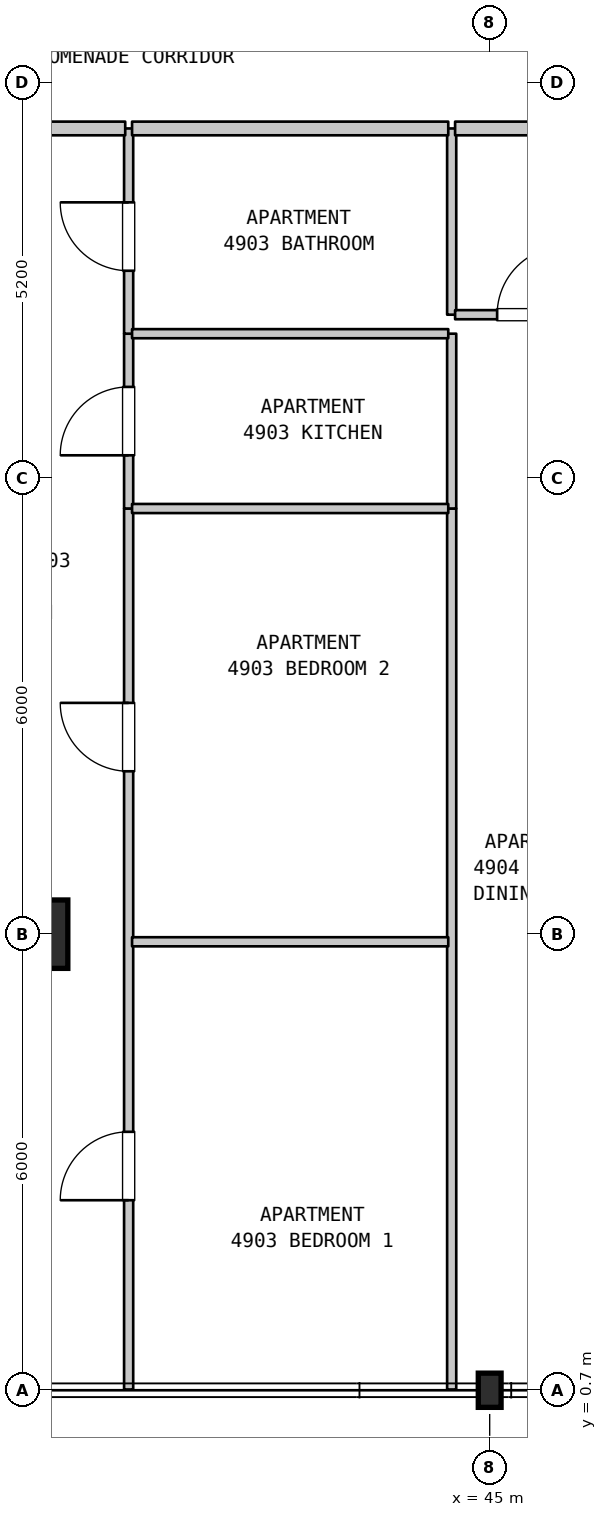
"""IFC4 building model, lengths in metres.
Left out: names, types, materials, properties, quantities, classifications, styles, units other than length and angle.
Written with IfcOpenShell. Run it as: python <this file> out.ifc"""

import sys

from ifc_helpers import new_model, si_unit, direction, frame, frame_2d, origin, origin_2d, place, context, subcontext, project, spatial, rectangle, i_section, extrude, element, fill, save


model = new_model("IFC4")
c1 = context("Model", 3, precision=1e-05, world=origin(), true_north=direction((0.0, 1.0)))
c2 = subcontext(c1, "Body", "Model", "MODEL_VIEW")
j1 = project(units=[si_unit("LENGTHUNIT", "METRE"), si_unit("PLANEANGLEUNIT", "RADIAN")], contexts=[c1])
p1 = place(None, origin())
s1 = spatial("IfcSite", under=j1, at=p1, CompositionType="ELEMENT")
p2 = place(p1, origin())
s2 = spatial("IfcBuilding", under=s1, at=p2, CompositionType="ELEMENT")
p3 = place(p2, frame((0.0, 0.0, 199.5)))
s3 = spatial("IfcBuildingStorey", under=s2, at=p3, CompositionType="ELEMENT", Elevation=199.5)
p4 = place(p3, frame((39.0, 6.7, 0.0), z_axis=(0.0, 0.0, 1.0), x_axis=(1.0, 0.0, 0.0)))
e1 = element("IfcColumn", 1, at=p4, inside=s3, PredefinedType="COLUMN", context=c2, shape_type="SweptSolid", body=[
    extrude(rectangle(XDim=0.9, YDim=0.9, at=origin_2d()), origin(), (0.0, 0.0, 1.0), 3.7),
])
p5 = place(p3, frame((45.0, 0.7, 0.0), z_axis=(0.0, 0.0, 1.0), x_axis=(1.0, 0.0, 0.0)))
e2 = element("IfcColumn", 2, at=p5, inside=s3, PredefinedType="COLUMN", context=c2, shape_type="SweptSolid", body=[
    extrude(i_section(OverallWidth=0.3, OverallDepth=0.45, WebThickness=0.014, FlangeThickness=0.026, FilletRadius=0.027, at=origin_2d()), origin(), (0.0, 0.0, 1.0), 3.7),
])
p6 = place(p3, frame((40.25, 0.71, 0.0), z_axis=(0.0, 0.0, 1.0), x_axis=(0.0, 1.0, 0.0)))
e3 = element("IfcWall", 3, at=p6, inside=s3, PredefinedType="PARTITIONING", context=c2, shape_type="SweptSolid", body=[
    extrude(rectangle(XDim=11.59, YDim=0.12, at=frame_2d((5.795, 0.0))), origin(), (0.0, 0.0, 1.0), 3.39),
])
p7 = place(p6, frame((2.49, 0.0, 0.0)))
e4 = element("IfcOpeningElement", 4, at=p7, cuts=e3, PredefinedType="OPENING", context=c2, shape_type="SweptSolid", body=[
    extrude(rectangle(XDim=0.9, YDim=2.15, at=frame_2d((0.45, 1.075))), frame((0.0, 0.07, 0.0), z_axis=(0.0, -1.0, 0.0), x_axis=(1.0, 0.0, 0.0)), (0.0, 0.0, 1.0), 0.14),
])
p8 = place(p6, frame((8.133, 0.0, 0.0)))
e5 = element("IfcOpeningElement", 5, at=p8, cuts=e3, PredefinedType="OPENING", context=c2, shape_type="SweptSolid", body=[
    extrude(rectangle(XDim=0.9, YDim=2.15, at=frame_2d((0.45, 1.075))), frame((0.0, 0.07, 0.0), z_axis=(0.0, -1.0, 0.0), x_axis=(1.0, 0.0, 0.0)), (0.0, 0.0, 1.0), 0.14),
])
p9 = place(p3, frame((40.25, 12.3, 0.0), z_axis=(0.0, 0.0, 1.0), x_axis=(0.0, 1.0, 0.0)))
e6 = element("IfcWall", 6, at=p9, inside=s3, PredefinedType="PARTITIONING", context=c2, shape_type="SweptSolid", body=[
    extrude(rectangle(XDim=2.3, YDim=0.12, at=frame_2d((1.15, 0.0))), origin(), (0.0, 0.0, 1.0), 3.39),
])
p10 = place(p9, frame((0.7, 0.0, 0.0)))
e7 = element("IfcOpeningElement", 7, at=p10, cuts=e6, PredefinedType="OPENING", context=c2, shape_type="SweptSolid", body=[
    extrude(rectangle(XDim=0.9, YDim=2.15, at=frame_2d((0.45, 1.075))), frame((0.0, 0.07, 0.0), z_axis=(0.0, -1.0, 0.0), x_axis=(1.0, 0.0, 0.0)), (0.0, 0.0, 1.0), 0.14),
])
p11 = place(p3, frame((40.25, 14.6, 0.0), z_axis=(0.0, 0.0, 1.0), x_axis=(0.0, 1.0, 0.0)))
e8 = element("IfcWall", 8, at=p11, inside=s3, PredefinedType="PARTITIONING", context=c2, shape_type="SweptSolid", body=[
    extrude(rectangle(XDim=2.7, YDim=0.12, at=frame_2d((1.35, 0.0))), origin(), (0.0, 0.0, 1.0), 3.39),
])
p12 = place(p11, frame((0.828, 0.0, 0.0)))
e9 = element("IfcOpeningElement", 9, at=p12, cuts=e8, PredefinedType="OPENING", context=c2, shape_type="SweptSolid", body=[
    extrude(rectangle(XDim=0.9, YDim=2.1, at=frame_2d((0.45, 1.05))), frame((0.0, 0.07, 0.0), z_axis=(0.0, -1.0, 0.0), x_axis=(1.0, 0.0, 0.0)), (0.0, 0.0, 1.0), 0.14),
])
p13 = place(p3, frame((44.5, 0.71, 0.0), z_axis=(0.0, 0.0, 1.0), x_axis=(0.0, 1.0, 0.0)))
e10 = element("IfcWall", 10, at=p13, inside=s3, PredefinedType="PARTITIONING", context=c2, shape_type="SweptSolid", body=[
    extrude(rectangle(XDim=11.59, YDim=0.12, at=frame_2d((5.795, 0.0))), origin(), (0.0, 0.0, 1.0), 3.39),
])
p14 = place(p3, frame((44.5, 12.3, 0.0), z_axis=(0.0, 0.0, 1.0), x_axis=(0.0, 1.0, 0.0)))
e11 = element("IfcWall", 11, at=p14, inside=s3, PredefinedType="PARTITIONING", context=c2, shape_type="SweptSolid", body=[
    extrude(rectangle(XDim=2.3, YDim=0.12, at=frame_2d((1.15, 0.0))), origin(), (0.0, 0.0, 1.0), 3.39),
])
p15 = place(p3, frame((44.5, 14.85, 0.0), z_axis=(0.0, 0.0, 1.0), x_axis=(0.0, 1.0, 0.0)))
e12 = element("IfcWall", 12, at=p15, inside=s3, PredefinedType="PARTITIONING", context=c2, shape_type="SweptSolid", body=[
    extrude(rectangle(XDim=2.45, YDim=0.12, at=frame_2d((1.225, 0.0))), origin(), (0.0, 0.0, 1.0), 3.39),
])
p16 = place(p3, frame((40.295, 6.6, 0.0), z_axis=(0.0, 0.0, 1.0), x_axis=(1.0, 0.0, 0.0)))
e13 = element("IfcWall", 13, at=p16, inside=s3, PredefinedType="PARTITIONING", context=c2, shape_type="SweptSolid", body=[
    extrude(rectangle(XDim=4.16, YDim=0.12, at=frame_2d((2.08, 0.0))), origin(), (0.0, 0.0, 1.0), 2.79),
])
for number, where, z_axis, x_axis in (
    (14, (40.295, 12.3, 0.0), (0.0, 0.0, 1.0), (1.0, 0.0, 0.0)),
    (15, (40.295, 14.6, 0.0), (0.0, 0.0, 1.0), (1.0, 0.0, 0.0)),
):
    element("IfcWall", number, at=place(p3, frame(where, z_axis=z_axis, x_axis=x_axis)), inside=s3, PredefinedType="PARTITIONING", context=c2, shape_type="SweptSolid", body=[
        extrude(rectangle(XDim=4.16, YDim=0.12, at=frame_2d((2.08, 0.0))), origin(), (0.0, 0.0, 1.0), 3.39),
    ])
p17 = place(p3, frame((44.545, 14.85, 0.0), z_axis=(0.0, 0.0, 1.0), x_axis=(1.0, 0.0, 0.0)))
e16 = element("IfcWall", 16, at=p17, inside=s3, PredefinedType="PARTITIONING", context=c2, shape_type="SweptSolid", body=[
    extrude(rectangle(XDim=2.16, YDim=0.12, at=frame_2d((1.08, 0.0))), origin(), (0.0, 0.0, 1.0), 3.39),
])
p18 = place(p17, frame((0.553, 0.0, 0.0)))
e17 = element("IfcOpeningElement", 17, at=p18, cuts=e16, PredefinedType="OPENING", context=c2, shape_type="SweptSolid", body=[
    extrude(rectangle(XDim=0.9, YDim=2.15, at=frame_2d((0.45, 1.075))), frame((0.0, 0.07, 0.0), z_axis=(0.0, -1.0, 0.0), x_axis=(1.0, 0.0, 0.0)), (0.0, 0.0, 1.0), 0.14),
])
p19 = place(p3, frame((36.695, 17.3, 0.0), z_axis=(0.0, 0.0, 1.0), x_axis=(1.0, 0.0, 0.0)))
e18 = element("IfcWall", 18, at=p19, inside=s3, PredefinedType="STANDARD", context=c2, shape_type="SweptSolid", body=[
    extrude(rectangle(XDim=3.51, YDim=0.18, at=frame_2d((1.755, 0.0))), origin(), (0.0, 0.0, 1.0), 3.39),
])
p20 = place(p19, frame((1.185, 0.0, 0.0)))
e19 = element("IfcOpeningElement", 19, at=p20, cuts=e18, PredefinedType="OPENING", context=c2, shape_type="SweptSolid", body=[
    extrude(rectangle(XDim=1.0, YDim=2.15, at=frame_2d((0.5, 1.075))), frame((0.0, 0.1, 0.0), z_axis=(0.0, -1.0, 0.0), x_axis=(1.0, 0.0, 0.0)), (0.0, 0.0, 1.0), 0.2),
])
p21 = place(p3, frame((40.295, 17.3, 0.0), z_axis=(0.0, 0.0, 1.0), x_axis=(1.0, 0.0, 0.0)))
e20 = element("IfcWall", 20, at=p21, inside=s3, PredefinedType="STANDARD", context=c2, shape_type="SweptSolid", body=[
    extrude(rectangle(XDim=4.16, YDim=0.18, at=frame_2d((2.08, 0.0))), origin(), (0.0, 0.0, 1.0), 3.39),
])
p22 = place(p3, frame((44.545, 17.3, 0.0), z_axis=(0.0, 0.0, 1.0), x_axis=(1.0, 0.0, 0.0)))
e21 = element("IfcWall", 21, at=p22, inside=s3, PredefinedType="STANDARD", context=c2, shape_type="SweptSolid", body=[
    extrude(rectangle(XDim=4.68, YDim=0.18, at=frame_2d((2.34, 0.0))), origin(), (0.0, 0.0, 1.0), 3.39),
])
p23 = place(p22, frame((1.769, 0.0, 0.0)))
e22 = element("IfcOpeningElement", 22, at=p23, cuts=e21, PredefinedType="OPENING", context=c2, shape_type="SweptSolid", body=[
    extrude(rectangle(XDim=1.0, YDim=2.15, at=frame_2d((0.5, 1.075))), frame((0.0, 0.1, 0.0), z_axis=(0.0, -1.0, 0.0), x_axis=(1.0, 0.0, 0.0)), (0.0, 0.0, 1.0), 0.2),
])
p24 = place(p7, origin())
e23 = element("IfcDoor", 23, at=p24, inside=s3, OperationType="SINGLE_SWING_LEFT", PredefinedType="DOOR", context=c2, shape_type="SweptSolid", body=[
    extrude(rectangle(XDim=0.9, YDim=2.15, at=frame_2d((0.45, 1.075))), frame((0.0, 0.025, 0.0), z_axis=(0.0, -1.0, 0.0), x_axis=(1.0, 0.0, 0.0)), (0.0, 0.0, 1.0), 0.05),
])
fill(e4, e23)
p25 = place(p8, origin())
e24 = element("IfcDoor", 24, at=p25, inside=s3, OperationType="SINGLE_SWING_RIGHT", PredefinedType="DOOR", context=c2, shape_type="SweptSolid", body=[
    extrude(rectangle(XDim=0.9, YDim=2.15, at=frame_2d((0.45, 1.075))), frame((0.0, 0.025, 0.0), z_axis=(0.0, -1.0, 0.0), x_axis=(1.0, 0.0, 0.0)), (0.0, 0.0, 1.0), 0.05),
])
fill(e5, e24)
p26 = place(p10, origin())
e25 = element("IfcDoor", 25, at=p26, inside=s3, OperationType="SINGLE_SWING_LEFT", PredefinedType="DOOR", context=c2, shape_type="SweptSolid", body=[
    extrude(rectangle(XDim=0.9, YDim=2.15, at=frame_2d((0.45, 1.075))), frame((0.0, 0.025, 0.0), z_axis=(0.0, -1.0, 0.0), x_axis=(1.0, 0.0, 0.0)), (0.0, 0.0, 1.0), 0.05),
])
fill(e7, e25)
p27 = place(p12, origin())
e26 = element("IfcDoor", 26, at=p27, inside=s3, OperationType="SINGLE_SWING_RIGHT", PredefinedType="DOOR", context=c2, shape_type="SweptSolid", body=[
    extrude(rectangle(XDim=0.9, YDim=2.1, at=frame_2d((0.45, 1.05))), frame((0.0, 0.025, 0.0), z_axis=(0.0, -1.0, 0.0), x_axis=(1.0, 0.0, 0.0)), (0.0, 0.0, 1.0), 0.05),
])
fill(e9, e26)
p28 = place(p18, origin())
e27 = element("IfcDoor", 27, at=p28, inside=s3, OperationType="SINGLE_SWING_RIGHT", PredefinedType="DOOR", context=c2, shape_type="SweptSolid", body=[
    extrude(rectangle(XDim=0.9, YDim=2.15, at=frame_2d((0.45, 1.075))), frame((0.0, 0.025, 0.0), z_axis=(0.0, -1.0, 0.0), x_axis=(1.0, 0.0, 0.0)), (0.0, 0.0, 1.0), 0.05),
])
fill(e17, e27)
save(model, sys.argv[1])
